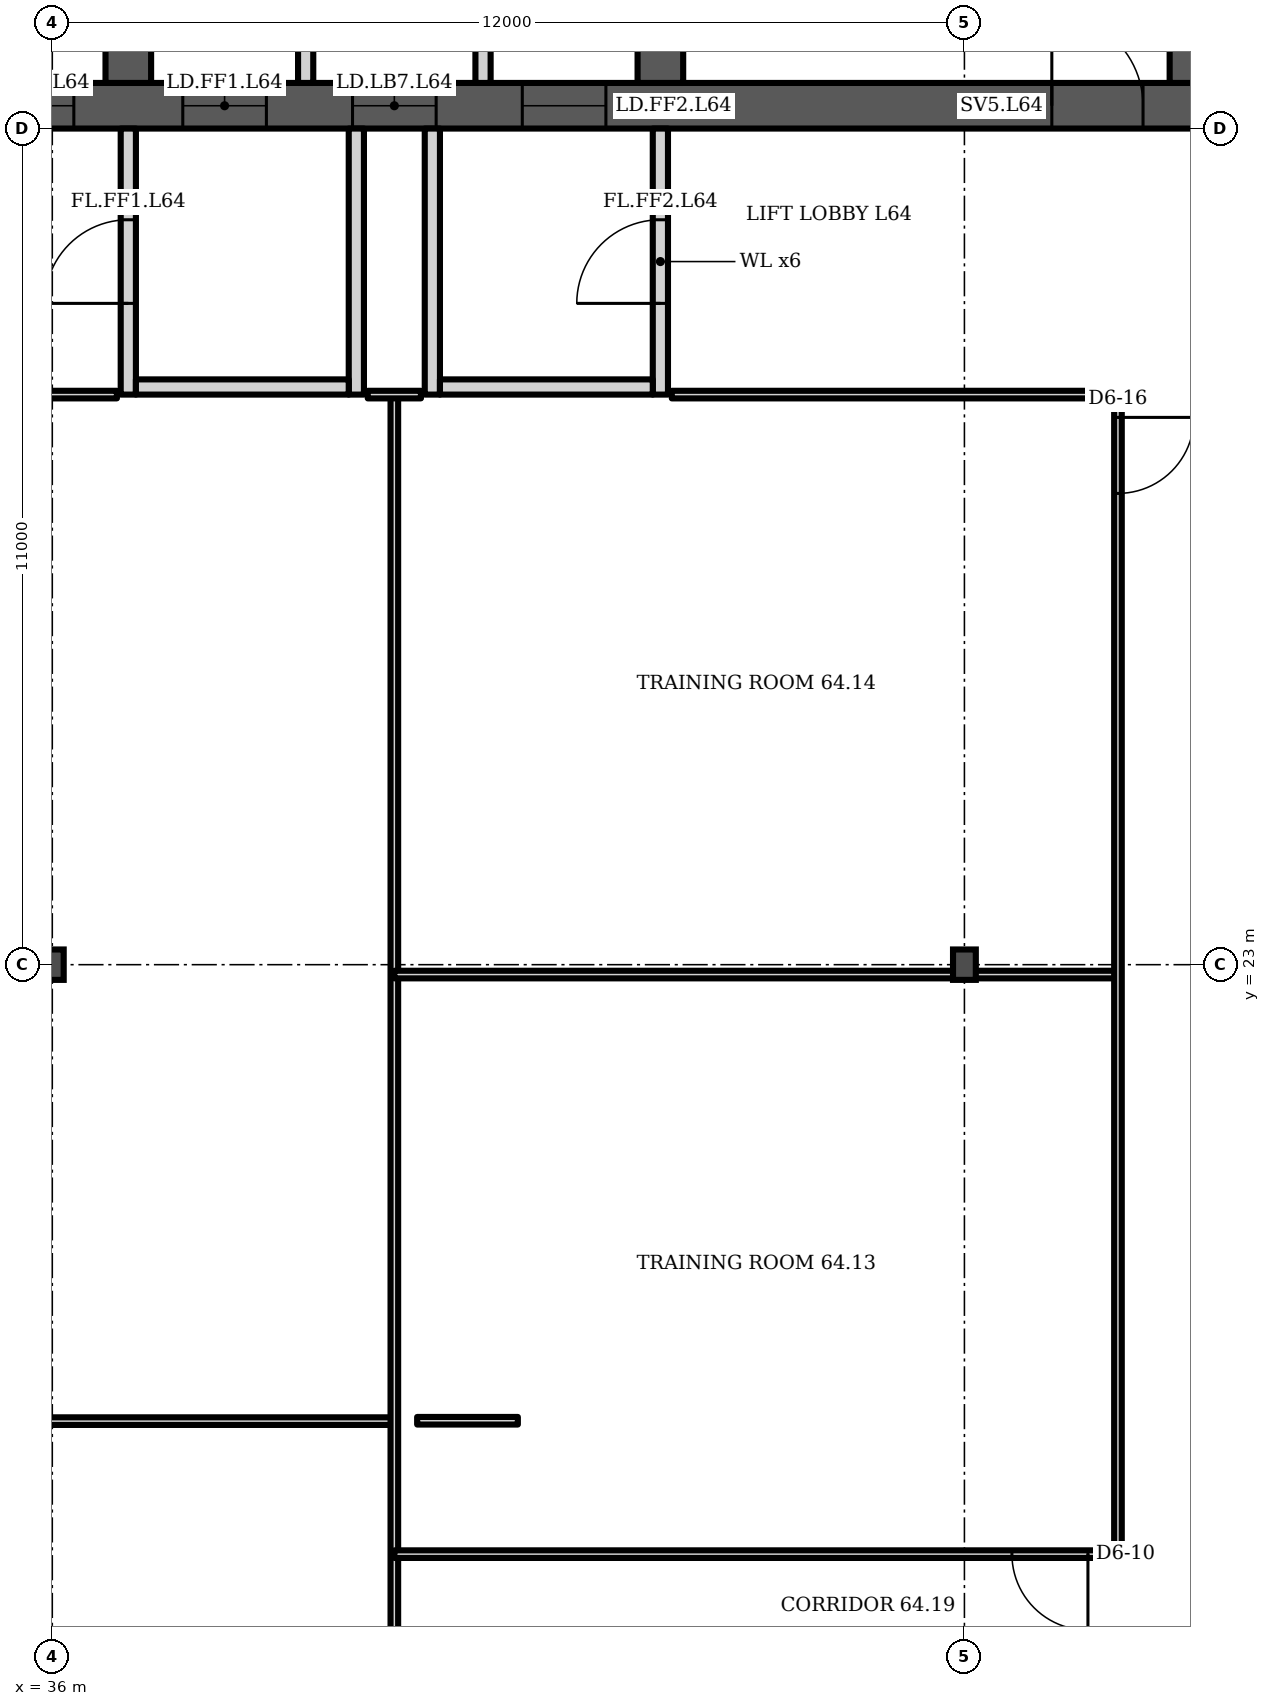
"""IFC4 building model, lengths in metres.
Left out: names, types, materials, properties, quantities, classifications, styles, units other than length and angle.
Written with IfcOpenShell. Run it as: python <this file> out.ifc"""

import sys

from ifc_helpers import new_model, si_unit, direction, frame, frame_2d, origin, origin_2d, place, context, subcontext, project, spatial, polyline, rectangle, i_section, outline, extrude, element, fill, save


model = new_model("IFC4")
c1 = context("Model", 3, precision=1e-05, world=origin(), true_north=direction((0.0, 1.0)))
c2 = subcontext(c1, "Body", "Model", "MODEL_VIEW")
j1 = project(units=[si_unit("LENGTHUNIT", "METRE"), si_unit("PLANEANGLEUNIT", "RADIAN")], contexts=[c1])
p1 = place(None, origin())
s1 = spatial("IfcSite", under=j1, at=p1, CompositionType="ELEMENT")
p2 = place(p1, origin())
s2 = spatial("IfcBuilding", under=s1, at=p2, CompositionType="ELEMENT")
p3 = place(p2, frame((0.0, 0.0, 253.9)))
s3 = spatial("IfcBuildingStorey", under=s2, at=p3, CompositionType="ELEMENT", Elevation=253.9)
p4 = place(p3, frame((23.0, 34.3, 0.0), z_axis=(0.0, 0.0, 1.0), x_axis=(1.0, 0.0, 0.0)))
e1 = element("IfcWall", 1, at=p4, inside=s3, PredefinedType="SHEAR", context=c2, shape_type="SweptSolid", body=[
    extrude(rectangle(XDim=35.0, YDim=0.6, at=frame_2d((17.5, 0.0))), origin(), (0.0, 0.0, 1.0), 3.6),
])
p5 = place(p4, frame((0.65, 0.0, 0.0)))
e2 = element("IfcOpeningElement", 2, at=p5, cuts=e1, PredefinedType="OPENING", context=c2, shape_type="SweptSolid", body=[
    extrude(rectangle(XDim=1.2, YDim=2.1, at=frame_2d((0.6, 1.05))), frame((0.0, 0.31, 0.0), z_axis=(0.0, -1.0, 0.0), x_axis=(1.0, 0.0, 0.0)), (0.0, 0.0, 1.0), 0.62),
])
p6 = place(p4, frame((7.717, 0.0, 0.0)))
e3 = element("IfcOpeningElement", 3, at=p6, cuts=e1, PredefinedType="OPENING", context=c2, shape_type="SweptSolid", body=[
    extrude(rectangle(XDim=1.1, YDim=2.1, at=frame_2d((0.55, 1.05))), frame((0.0, 0.31, 0.0), z_axis=(0.0, -1.0, 0.0), x_axis=(1.0, 0.0, 0.0)), (0.0, 0.0, 1.0), 0.62),
])
p7 = place(p4, frame((12.183, 0.0, 0.0)))
e4 = element("IfcOpeningElement", 4, at=p7, cuts=e1, PredefinedType="OPENING", context=c2, shape_type="SweptSolid", body=[
    extrude(rectangle(XDim=1.1, YDim=2.1, at=frame_2d((0.55, 1.05))), frame((0.0, 0.31, 0.0), z_axis=(0.0, -1.0, 0.0), x_axis=(1.0, 0.0, 0.0)), (0.0, 0.0, 1.0), 0.62),
])
p8 = place(p4, frame((9.8, 0.0, 0.0)))
e5 = element("IfcOpeningElement", 5, at=p8, cuts=e1, PredefinedType="OPENING", context=c2, shape_type="SweptSolid", body=[
    extrude(rectangle(XDim=1.4, YDim=2.1, at=frame_2d((0.7, 1.05))), frame((0.0, 0.31, 0.0), z_axis=(0.0, -1.0, 0.0), x_axis=(1.0, 0.0, 0.0)), (0.0, 0.0, 1.0), 0.62),
])
p9 = place(p4, frame((14.717, 0.0, 0.0)))
e6 = element("IfcOpeningElement", 6, at=p9, cuts=e1, PredefinedType="OPENING", context=c2, shape_type="SweptSolid", body=[
    extrude(rectangle(XDim=1.1, YDim=2.1, at=frame_2d((0.55, 1.05))), frame((0.0, 0.31, 0.0), z_axis=(0.0, -1.0, 0.0), x_axis=(1.0, 0.0, 0.0)), (0.0, 0.0, 1.0), 0.62),
])
p10 = place(p4, frame((16.95, 0.0, 0.0)))
e7 = element("IfcOpeningElement", 7, at=p10, cuts=e1, PredefinedType="OPENING", context=c2, shape_type="SweptSolid", body=[
    extrude(rectangle(XDim=1.1, YDim=2.1, at=frame_2d((0.55, 1.05))), frame((0.0, 0.31, 0.0), z_axis=(0.0, -1.0, 0.0), x_axis=(1.0, 0.0, 0.0)), (0.0, 0.0, 1.0), 0.62),
])
p11 = place(p4, frame((19.183, 0.0, 0.0)))
e8 = element("IfcOpeningElement", 8, at=p11, cuts=e1, PredefinedType="OPENING", context=c2, shape_type="SweptSolid", body=[
    extrude(rectangle(XDim=1.1, YDim=2.1, at=frame_2d((0.55, 1.05))), frame((0.0, 0.31, 0.0), z_axis=(0.0, -1.0, 0.0), x_axis=(1.0, 0.0, 0.0)), (0.0, 0.0, 1.0), 0.62),
])
p12 = place(p4, frame((26.15, 0.0, 0.0)))
e9 = element("IfcOpeningElement", 9, at=p12, cuts=e1, PredefinedType="OPENING", context=c2, shape_type="SweptSolid", body=[
    extrude(rectangle(XDim=1.2, YDim=2.1, at=frame_2d((0.6, 1.05))), frame((0.0, 0.31, 0.0), z_axis=(0.0, -1.0, 0.0), x_axis=(1.0, 0.0, 0.0)), (0.0, 0.0, 1.0), 0.62),
])
p13 = place(p4, frame((28.767, 0.0, 0.0)))
e10 = element("IfcOpeningElement", 10, at=p13, cuts=e1, PredefinedType="OPENING", context=c2, shape_type="SweptSolid", body=[
    extrude(rectangle(XDim=1.0, YDim=2.1, at=frame_2d((0.5, 1.05))), frame((0.0, 0.31, 0.0), z_axis=(0.0, -1.0, 0.0), x_axis=(1.0, 0.0, 0.0)), (0.0, 0.0, 1.0), 0.62),
])
p14 = place(p4, frame((33.083, 0.0, 0.0)))
e11 = element("IfcOpeningElement", 11, at=p14, cuts=e1, PredefinedType="OPENING", context=c2, shape_type="SweptSolid", body=[
    extrude(rectangle(XDim=1.0, YDim=2.1, at=frame_2d((0.5, 1.05))), frame((0.0, 0.31, 0.0), z_axis=(0.0, -1.0, 0.0), x_axis=(1.0, 0.0, 0.0)), (0.0, 0.0, 1.0), 0.62),
])
p15 = place(p4, frame((30.8, 0.0, 0.0)))
e12 = element("IfcOpeningElement", 12, at=p15, cuts=e1, PredefinedType="OPENING", context=c2, shape_type="SweptSolid", body=[
    extrude(rectangle(XDim=1.4, YDim=2.1, at=frame_2d((0.7, 1.05))), frame((0.0, 0.31, 0.0), z_axis=(0.0, -1.0, 0.0), x_axis=(1.0, 0.0, 0.0)), (0.0, 0.0, 1.0), 0.62),
])
p16 = place(p3, frame((37.0, 34.6, 0.0), z_axis=(0.0, 0.0, 1.0), x_axis=(0.0, 1.0, 0.0)))
e13 = element("IfcWall", 13, at=p16, inside=s3, PredefinedType="SHEAR", context=c2, shape_type="SweptSolid", body=[
    extrude(rectangle(XDim=14.784, YDim=0.6, at=frame_2d((7.392, 0.0))), origin(), (0.0, 0.0, 1.0), 3.6),
])
p17 = place(p16, frame((11.302, 0.0, 0.0)))
e14 = element("IfcOpeningElement", 14, at=p17, cuts=e13, PredefinedType="OPENING", context=c2, shape_type="SweptSolid", body=[
    extrude(rectangle(XDim=1.0, YDim=2.1, at=frame_2d((0.5, 1.05))), frame((0.0, 0.31, 0.0), z_axis=(0.0, -1.0, 0.0), x_axis=(1.0, 0.0, 0.0)), (0.0, 0.0, 1.0), 0.62),
])
p18 = place(p16, frame((3.8, 0.0, 0.0)))
e15 = element("IfcOpeningElement", 15, at=p18, cuts=e13, PredefinedType="OPENING", context=c2, shape_type="SweptSolid", body=[
    extrude(rectangle(XDim=1.1, YDim=2.1, at=frame_2d((0.55, 1.05))), frame((0.0, 0.31, 0.0), z_axis=(0.0, -1.0, 0.0), x_axis=(1.0, 0.0, 0.0)), (0.0, 0.0, 1.0), 0.62),
])
p19 = place(p3, frame((44.0, 34.6, 0.0), z_axis=(0.0, 0.0, 1.0), x_axis=(0.0, 1.0, 0.0)))
e16 = element("IfcWall", 16, at=p19, inside=s3, PredefinedType="SHEAR", context=c2, shape_type="SweptSolid", body=[
    extrude(rectangle(XDim=14.784, YDim=0.6, at=frame_2d((7.392, 0.0))), origin(), (0.0, 0.0, 1.0), 3.6),
])
p20 = place(p19, frame((11.608, 0.0, 0.0)))
e17 = element("IfcOpeningElement", 17, at=p20, cuts=e16, PredefinedType="OPENING", context=c2, shape_type="SweptSolid", body=[
    extrude(rectangle(XDim=1.0, YDim=2.1, at=frame_2d((0.5, 1.05))), frame((0.0, 0.31, 0.0), z_axis=(0.0, -1.0, 0.0), x_axis=(1.0, 0.0, 0.0)), (0.0, 0.0, 1.0), 0.62),
])
p21 = place(p19, frame((3.8, 0.0, 0.0)))
e18 = element("IfcOpeningElement", 18, at=p21, cuts=e16, PredefinedType="OPENING", context=c2, shape_type="SweptSolid", body=[
    extrude(rectangle(XDim=1.1, YDim=2.1, at=frame_2d((0.55, 1.05))), frame((0.0, 0.31, 0.0), z_axis=(0.0, -1.0, 0.0), x_axis=(1.0, 0.0, 0.0)), (0.0, 0.0, 1.0), 0.62),
])
p22 = place(p3, frame((51.0, 34.6, 0.0), z_axis=(0.0, 0.0, 1.0), x_axis=(0.0, 1.0, 0.0)))
e19 = element("IfcWall", 19, at=p22, inside=s3, PredefinedType="SHEAR", context=c2, shape_type="SweptSolid", body=[
    extrude(rectangle(XDim=14.171, YDim=0.6, at=frame_2d((7.085, 0.0))), origin(), (0.0, 0.0, 1.0), 3.6),
])
p23 = place(p22, frame((3.8, 0.0, 0.0)))
e20 = element("IfcOpeningElement", 20, at=p23, cuts=e19, PredefinedType="OPENING", context=c2, shape_type="SweptSolid", body=[
    extrude(rectangle(XDim=1.1, YDim=2.1, at=frame_2d((0.55, 1.05))), frame((0.0, 0.31, 0.0), z_axis=(0.0, -1.0, 0.0), x_axis=(1.0, 0.0, 0.0)), (0.0, 0.0, 1.0), 0.62),
])
for number, where, z_axis, x_axis in (
    (21, (36.0, 23.0, 0.0), (0.0, 0.0, 1.0), (1.0, 0.0, 0.0)),
    (22, (48.0, 23.0, 0.0), (0.0, 0.0, 1.0), (1.0, 0.0, 0.0)),
):
    element("IfcColumn", number, at=place(p3, frame(where, z_axis=z_axis, x_axis=x_axis)), inside=s3, PredefinedType="COLUMN", context=c2, shape_type="SweptSolid", body=[
        extrude(i_section(OverallWidth=0.3, OverallDepth=0.4, WebThickness=0.013, FlangeThickness=0.024, FilletRadius=0.027, at=origin_2d()), origin(), (0.0, 0.0, 1.0), 3.6),
    ])
p24 = place(p3, origin())
e23 = element("IfcWall", 23, at=p24, inside=s3, PredefinedType="PARTITIONING", context=c2, shape_type="SweptSolid", body=[
    extrude(outline(polyline([(34.567, 37.65), (34.767, 37.65), (36.7, 37.65), (36.7, 37.45), (34.767, 37.45), (34.767, 34.6), (34.567, 34.6), (34.567, 37.65)])), origin(), (0.0, 0.0, 1.0), 3.2),
])
p25 = place(p3, origin())
e24 = element("IfcWall", 24, at=p25, inside=s3, PredefinedType="PARTITIONING", context=c2, shape_type="SweptSolid", body=[
    extrude(outline(polyline([(41.567, 37.1), (39.433, 37.1), (39.433, 34.6), (39.233, 34.6), (39.233, 37.45), (37.3, 37.45), (37.3, 37.65), (39.233, 37.65), (39.433, 37.65), (39.433, 37.3), (41.567, 37.3), (41.567, 37.35), (41.767, 37.35), (43.7, 37.35), (43.7, 37.15), (41.767, 37.15), (41.767, 34.6), (41.567, 34.6), (41.567, 37.1)])), origin(), (0.0, 0.0, 1.0), 3.2),
])
p26 = place(p3, frame((37.0, 30.5, 0.0), z_axis=(0.0, 0.0, 1.0), x_axis=(0.0, 1.0, 0.0)))
e25 = element("IfcWall", 25, at=p26, inside=s3, PredefinedType="PARTITIONING", context=c2, shape_type="SweptSolid", body=[
    extrude(rectangle(XDim=3.5, YDim=0.2, at=frame_2d((1.75, 0.0))), origin(), (0.0, 0.0, 1.0), 3.2),
])
p27 = place(p26, frame((1.2, 0.0, 0.0)))
e26 = element("IfcOpeningElement", 26, at=p27, cuts=e25, PredefinedType="OPENING", context=c2, shape_type="SweptSolid", body=[
    extrude(rectangle(XDim=1.1, YDim=2.1, at=frame_2d((0.55, 1.05))), frame((0.0, 0.11, 0.0), z_axis=(0.0, -1.0, 0.0), x_axis=(1.0, 0.0, 0.0)), (0.0, 0.0, 1.0), 0.22),
])
p28 = place(p3, frame((40.0, 30.5, 0.0), z_axis=(0.0, 0.0, 1.0), x_axis=(0.0, 1.0, 0.0)))
e27 = element("IfcWall", 27, at=p28, inside=s3, PredefinedType="PARTITIONING", context=c2, shape_type="SweptSolid", body=[
    extrude(rectangle(XDim=3.5, YDim=0.2, at=frame_2d((1.75, 0.0))), origin(), (0.0, 0.0, 1.0), 3.2),
])
p29 = place(p3, frame((37.1, 30.6, 0.0), z_axis=(0.0, 0.0, 1.0), x_axis=(1.0, 0.0, 0.0)))
e28 = element("IfcWall", 28, at=p29, inside=s3, PredefinedType="PARTITIONING", context=c2, shape_type="SweptSolid", body=[
    extrude(rectangle(XDim=2.8, YDim=0.2, at=frame_2d((1.4, 0.0))), origin(), (0.0, 0.0, 1.0), 3.2),
])
p30 = place(p3, frame((41.0, 30.5, 0.0), z_axis=(0.0, 0.0, 1.0), x_axis=(0.0, 1.0, 0.0)))
e29 = element("IfcWall", 29, at=p30, inside=s3, PredefinedType="PARTITIONING", context=c2, shape_type="SweptSolid", body=[
    extrude(rectangle(XDim=3.5, YDim=0.2, at=frame_2d((1.75, 0.0))), origin(), (0.0, 0.0, 1.0), 3.2),
])
p31 = place(p3, frame((44.0, 30.5, 0.0), z_axis=(0.0, 0.0, 1.0), x_axis=(0.0, 1.0, 0.0)))
e30 = element("IfcWall", 30, at=p31, inside=s3, PredefinedType="PARTITIONING", context=c2, shape_type="SweptSolid", body=[
    extrude(rectangle(XDim=3.5, YDim=0.2, at=frame_2d((1.75, 0.0))), origin(), (0.0, 0.0, 1.0), 3.2),
])
p32 = place(p31, frame((1.2, 0.0, 0.0)))
e31 = element("IfcOpeningElement", 31, at=p32, cuts=e30, PredefinedType="OPENING", context=c2, shape_type="SweptSolid", body=[
    extrude(rectangle(XDim=1.1, YDim=2.1, at=frame_2d((0.55, 1.05))), frame((0.0, 0.11, 0.0), z_axis=(0.0, -1.0, 0.0), x_axis=(1.0, 0.0, 0.0)), (0.0, 0.0, 1.0), 0.22),
])
p33 = place(p3, frame((41.1, 30.6, 0.0), z_axis=(0.0, 0.0, 1.0), x_axis=(1.0, 0.0, 0.0)))
e32 = element("IfcWall", 32, at=p33, inside=s3, PredefinedType="PARTITIONING", context=c2, shape_type="SweptSolid", body=[
    extrude(rectangle(XDim=2.8, YDim=0.2, at=frame_2d((1.4, 0.0))), origin(), (0.0, 0.0, 1.0), 3.2),
])
p34 = place(p3, frame((29.1, 16.995, 0.0), z_axis=(0.0, 0.0, 1.0), x_axis=(1.0, 0.0, 0.0)))
e33 = element("IfcWall", 33, at=p34, inside=s3, PredefinedType="PARTITIONING", context=c2, shape_type="SweptSolid", body=[
    extrude(rectangle(XDim=11.4, YDim=0.1, at=frame_2d((5.7, 0.0))), origin(), (0.0, 0.0, 1.0), 3.2),
])
p35 = place(p3, frame((29.1, 30.5, 0.0), z_axis=(0.0, 0.0, 1.0), x_axis=(1.0, 0.0, 0.0)))
e34 = element("IfcWall", 34, at=p35, inside=s3, PredefinedType="PARTITIONING", context=c2, shape_type="SweptSolid", body=[
    extrude(rectangle(XDim=7.75, YDim=0.1, at=frame_2d((3.875, 0.0))), origin(), (0.0, 0.0, 1.0), 3.2),
])
p36 = place(p3, frame((40.5, 13.463, 0.0), z_axis=(0.0, 0.0, 1.0), x_axis=(0.0, 1.0, 0.0)))
e35 = element("IfcWall", 35, at=p36, inside=s3, PredefinedType="PARTITIONING", context=c2, shape_type="SweptSolid", body=[
    extrude(rectangle(XDim=17.037, YDim=0.1, at=frame_2d((8.519, 0.0))), origin(), (0.0, 0.0, 1.0), 3.2),
])
p37 = place(p3, frame((40.5, 15.245, 0.0), z_axis=(0.0, 0.0, 1.0), x_axis=(1.0, 0.0, 0.0)))
e36 = element("IfcWall", 36, at=p37, inside=s3, PredefinedType="PARTITIONING", context=c2, shape_type="SweptSolid", body=[
    extrude(rectangle(XDim=9.52, YDim=0.1, at=frame_2d((4.76, 0.0))), origin(), (0.0, 0.0, 1.0), 3.2),
])
p38 = place(p37, frame((8.125, 0.0, 0.0)))
e37 = element("IfcOpeningElement", 37, at=p38, cuts=e36, PredefinedType="OPENING", context=c2, shape_type="SweptSolid", body=[
    extrude(rectangle(XDim=1.0, YDim=2.1, at=frame_2d((0.5, 1.05))), frame((0.0, 0.06, 0.0), z_axis=(0.0, -1.0, 0.0), x_axis=(1.0, 0.0, 0.0)), (0.0, 0.0, 1.0), 0.12),
])
p39 = place(p3, frame((40.5, 22.87, 0.0), z_axis=(0.0, 0.0, 1.0), x_axis=(1.0, 0.0, 0.0)))
e38 = element("IfcWall", 38, at=p39, inside=s3, PredefinedType="PARTITIONING", context=c2, shape_type="SweptSolid", body=[
    extrude(rectangle(XDim=9.52, YDim=0.1, at=frame_2d((4.76, 0.0))), origin(), (0.0, 0.0, 1.0), 3.2),
])
p40 = place(p3, frame((40.8, 17.0, 0.0), z_axis=(0.0, 0.0, 1.0), x_axis=(1.0, 0.0, 0.0)))
e39 = element("IfcWall", 39, at=p40, inside=s3, PredefinedType="PARTITIONING", context=c2, shape_type="SweptSolid", body=[
    extrude(rectangle(XDim=1.325, YDim=0.1, at=frame_2d((0.663, 0.0))), origin(), (0.0, 0.0, 1.0), 3.2),
])
p41 = place(p3, frame((50.02, 15.245, 0.0), z_axis=(0.0, 0.0, 1.0), x_axis=(0.0, 1.0, 0.0)))
e40 = element("IfcWall", 40, at=p41, inside=s3, PredefinedType="PARTITIONING", context=c2, shape_type="SweptSolid", body=[
    extrude(rectangle(XDim=15.255, YDim=0.1, at=frame_2d((7.627, 0.0))), origin(), (0.0, 0.0, 1.0), 3.2),
])
p42 = place(p41, frame((13.955, 0.0, 0.0)))
e41 = element("IfcOpeningElement", 41, at=p42, cuts=e40, PredefinedType="OPENING", context=c2, shape_type="SweptSolid", body=[
    extrude(rectangle(XDim=1.0, YDim=2.1, at=frame_2d((0.5, 1.05))), frame((0.0, 0.06, 0.0), z_axis=(0.0, -1.0, 0.0), x_axis=(1.0, 0.0, 0.0)), (0.0, 0.0, 1.0), 0.12),
])
p43 = place(p3, frame((40.15, 30.5, 0.0), z_axis=(0.0, 0.0, 1.0), x_axis=(1.0, 0.0, 0.0)))
e42 = element("IfcWall", 42, at=p43, inside=s3, PredefinedType="PARTITIONING", context=c2, shape_type="SweptSolid", body=[
    extrude(rectangle(XDim=0.7, YDim=0.1, at=frame_2d((0.35, 0.0))), origin(), (0.0, 0.0, 1.0), 3.2),
])
p44 = place(p3, frame((44.15, 30.5, 0.0), z_axis=(0.0, 0.0, 1.0), x_axis=(1.0, 0.0, 0.0)))
e43 = element("IfcWall", 43, at=p44, inside=s3, PredefinedType="PARTITIONING", context=c2, shape_type="SweptSolid", body=[
    extrude(rectangle(XDim=5.87, YDim=0.1, at=frame_2d((2.935, 0.0))), origin(), (0.0, 0.0, 1.0), 3.2),
])
p45 = place(p7, origin())
e44 = element("IfcDoor", 44, at=p45, inside=s3, OperationType="DOUBLE_DOOR_SLIDING", PredefinedType="DOOR", context=c2, shape_type="SweptSolid", body=[
    extrude(rectangle(XDim=1.1, YDim=2.1, at=frame_2d((0.55, 1.05))), frame((0.0, 0.025, 0.0), z_axis=(0.0, -1.0, 0.0), x_axis=(1.0, 0.0, 0.0)), (0.0, 0.0, 1.0), 0.05),
])
fill(e4, e44)
p46 = place(p9, origin())
e45 = element("IfcDoor", 45, at=p46, inside=s3, OperationType="DOUBLE_DOOR_SLIDING", PredefinedType="DOOR", context=c2, shape_type="SweptSolid", body=[
    extrude(rectangle(XDim=1.1, YDim=2.1, at=frame_2d((0.55, 1.05))), frame((0.0, 0.025, 0.0), z_axis=(0.0, -1.0, 0.0), x_axis=(1.0, 0.0, 0.0)), (0.0, 0.0, 1.0), 0.05),
])
fill(e6, e45)
p47 = place(p10, origin())
e46 = element("IfcDoor", 46, at=p47, inside=s3, OperationType="DOUBLE_DOOR_SLIDING", PredefinedType="DOOR", context=c2, shape_type="SweptSolid", body=[
    extrude(rectangle(XDim=1.1, YDim=2.1, at=frame_2d((0.55, 1.05))), frame((0.0, 0.025, 0.0), z_axis=(0.0, -1.0, 0.0), x_axis=(1.0, 0.0, 0.0)), (0.0, 0.0, 1.0), 0.05),
])
fill(e7, e46)
p48 = place(p11, origin())
e47 = element("IfcDoor", 47, at=p48, inside=s3, OperationType="DOUBLE_DOOR_SLIDING", PredefinedType="DOOR", context=c2, shape_type="SweptSolid", body=[
    extrude(rectangle(XDim=1.1, YDim=2.1, at=frame_2d((0.55, 1.05))), frame((0.0, 0.025, 0.0), z_axis=(0.0, -1.0, 0.0), x_axis=(1.0, 0.0, 0.0)), (0.0, 0.0, 1.0), 0.05),
])
fill(e8, e47)
p49 = place(p12, origin())
e48 = element("IfcDoor", 48, at=p49, inside=s3, OperationType="SINGLE_SWING_LEFT", PredefinedType="DOOR", context=c2, shape_type="SweptSolid", body=[
    extrude(rectangle(XDim=1.2, YDim=2.1, at=frame_2d((0.6, 1.05))), frame((0.0, 0.025, 0.0), z_axis=(0.0, -1.0, 0.0), x_axis=(1.0, 0.0, 0.0)), (0.0, 0.0, 1.0), 0.05),
])
fill(e9, e48)
p50 = place(p27, origin())
e49 = element("IfcDoor", 49, at=p50, inside=s3, OperationType="SINGLE_SWING_LEFT", PredefinedType="DOOR", context=c2, shape_type="SweptSolid", body=[
    extrude(rectangle(XDim=1.1, YDim=2.1, at=frame_2d((0.55, 1.05))), frame((0.0, 0.025, 0.0), z_axis=(0.0, -1.0, 0.0), x_axis=(1.0, 0.0, 0.0)), (0.0, 0.0, 1.0), 0.05),
])
fill(e26, e49)
p51 = place(p32, origin())
e50 = element("IfcDoor", 50, at=p51, inside=s3, OperationType="SINGLE_SWING_LEFT", PredefinedType="DOOR", context=c2, shape_type="SweptSolid", body=[
    extrude(rectangle(XDim=1.1, YDim=2.1, at=frame_2d((0.55, 1.05))), frame((0.0, 0.025, 0.0), z_axis=(0.0, -1.0, 0.0), x_axis=(1.0, 0.0, 0.0)), (0.0, 0.0, 1.0), 0.05),
])
fill(e31, e50)
p52 = place(p38, origin())
e51 = element("IfcDoor", 51, at=p52, inside=s3, OperationType="SINGLE_SWING_RIGHT", PredefinedType="DOOR", context=c2, shape_type="SweptSolid", body=[
    extrude(rectangle(XDim=1.0, YDim=2.1, at=frame_2d((0.5, 1.05))), frame((0.0, 0.025, 0.0), z_axis=(0.0, -1.0, 0.0), x_axis=(1.0, 0.0, 0.0)), (0.0, 0.0, 1.0), 0.05),
])
fill(e37, e51)
p53 = place(p42, origin())
e52 = element("IfcDoor", 52, at=p53, inside=s3, OperationType="SINGLE_SWING_RIGHT", PredefinedType="DOOR", context=c2, shape_type="SweptSolid", body=[
    extrude(rectangle(XDim=1.0, YDim=2.1, at=frame_2d((0.5, 1.05))), frame((0.0, 0.025, 0.0), z_axis=(0.0, -1.0, 0.0), x_axis=(1.0, 0.0, 0.0)), (0.0, 0.0, 1.0), 0.05),
])
fill(e41, e52)
save(model, sys.argv[1])
